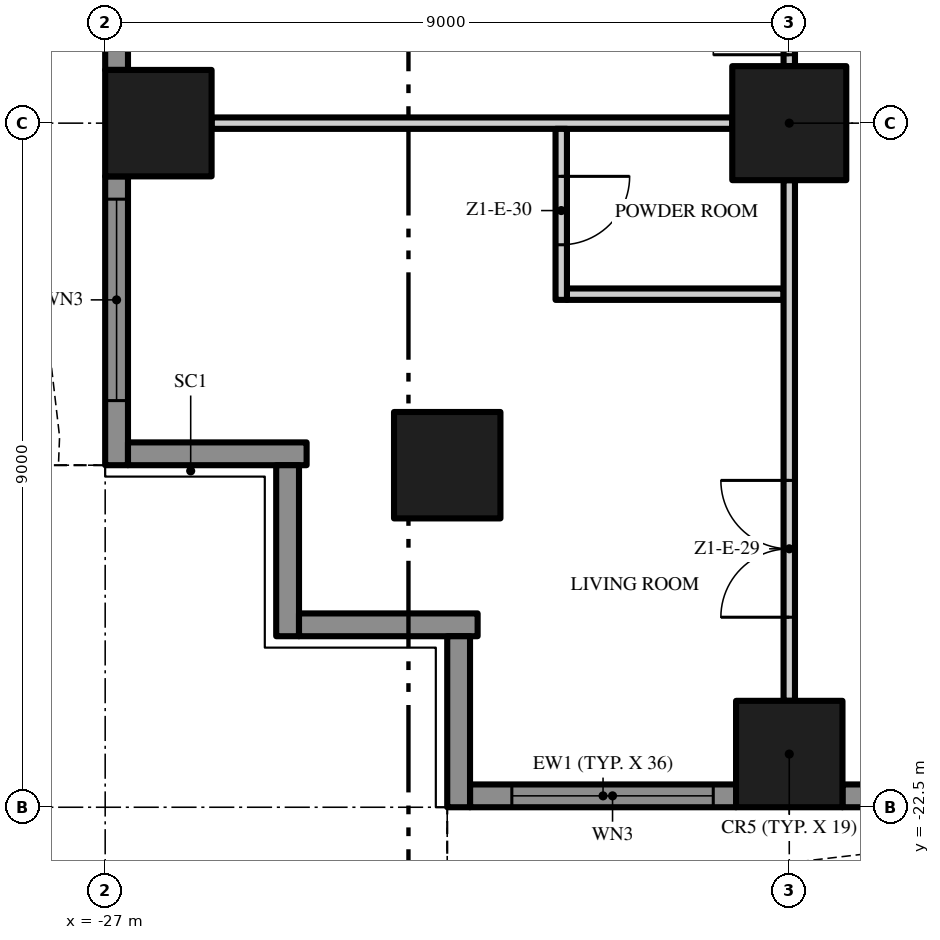
"""IFC4 building model, lengths in metres.
Left out: names, types, materials, properties, quantities, classifications, styles, units other than length and angle.
Written with IfcOpenShell. Run it as: python <this file> out.ifc"""

import sys

from ifc_helpers import new_model, si_unit, direction, frame, frame_2d, origin, origin_2d, place, context, subcontext, project, spatial, polyline, rectangle, outline, extrude, element, fill, save


model = new_model("IFC4")
c1 = context("Model", 3, precision=1e-05, world=origin(), true_north=direction((0.0, 1.0)))
c2 = subcontext(c1, "Body", "Model", "MODEL_VIEW")
j1 = project(units=[si_unit("LENGTHUNIT", "METRE"), si_unit("PLANEANGLEUNIT", "RADIAN")], contexts=[c1])
p1 = place(None, origin())
s1 = spatial("IfcSite", under=j1, at=p1, CompositionType="ELEMENT")
p2 = place(p1, origin())
s2 = spatial("IfcBuilding", under=s1, at=p2, CompositionType="ELEMENT")
p3 = place(p2, frame((0.0, 0.0, 56.8)))
s3 = spatial("IfcBuildingStorey", under=s2, at=p3, CompositionType="ELEMENT", Elevation=56.8)
p4 = place(p3, frame((-18.0, -13.5, 0.0), z_axis=(0.0, 0.0, 1.0), x_axis=(1.0, 0.0, 0.0)))
e1 = element("IfcColumn", 1, at=p4, inside=s3, PredefinedType="COLUMN", context=c2, shape_type="SweptSolid", body=[
    extrude(rectangle(XDim=1.5, YDim=1.5, at=origin_2d()), origin(), (0.0, 0.0, 1.0), 3.5),
])
for number, where, z_axis, x_axis in (
    (2, (-18.0, -21.8, 0.0), (0.0, 0.0, 1.0), (1.0, 0.0, 0.0)),
    (3, (-26.3, -13.5, 0.0), (0.0, 0.0, 1.0), (1.0, 0.0, 0.0)),
    (4, (-22.5, -18.0, 0.0), (0.0, 0.0, 1.0), (1.0, 0.0, 0.0)),
):
    element("IfcColumn", number, at=place(p3, frame(where, z_axis=z_axis, x_axis=x_axis)), inside=s3, PredefinedType="COLUMN", context=c2, shape_type="SweptSolid", body=[
        extrude(rectangle(XDim=1.4, YDim=1.4, at=origin_2d()), origin(), (0.0, 0.0, 1.0), 3.5),
    ])
p5 = place(p3, frame((-18.7, -22.35, 0.0), z_axis=(0.0, 0.0, 1.0), x_axis=(-1.0, 0.0, 0.0)))
e5 = element("IfcWall", 5, at=p5, inside=s3, PredefinedType="SOLIDWALL", context=c2, shape_type="SweptSolid", body=[
    extrude(rectangle(XDim=3.5, YDim=0.3, at=frame_2d((1.75, 0.0))), origin(), (0.0, 0.0, 1.0), 3.5),
])
p6 = place(p5, frame((0.3, 0.0, 0.45)))
e6 = element("IfcOpeningElement", 6, at=p6, cuts=e5, PredefinedType="OPENING", context=c2, shape_type="SweptSolid", body=[
    extrude(rectangle(XDim=2.65, YDim=2.65, at=frame_2d((1.325, 1.325))), frame((0.0, 0.16, 0.0), z_axis=(0.0, -1.0, 0.0), x_axis=(1.0, 0.0, 0.0)), (0.0, 0.0, 1.0), 0.32),
])
p7 = place(p3, frame((-9.7, -22.35, 0.0), z_axis=(0.0, 0.0, 1.0), x_axis=(-1.0, 0.0, 0.0)))
e7 = element("IfcWall", 7, at=p7, inside=s3, PredefinedType="SOLIDWALL", context=c2, shape_type="SweptSolid", body=[
    extrude(rectangle(XDim=7.6, YDim=0.3, at=frame_2d((3.8, 0.0))), origin(), (0.0, 0.0, 1.0), 3.5),
])
p8 = place(p7, frame((4.65, 0.0, 0.45)))
e8 = element("IfcOpeningElement", 8, at=p8, cuts=e7, PredefinedType="OPENING", context=c2, shape_type="SweptSolid", body=[
    extrude(rectangle(XDim=2.65, YDim=2.65, at=frame_2d((1.325, 1.325))), frame((0.0, 0.16, 0.0), z_axis=(0.0, -1.0, 0.0), x_axis=(1.0, 0.0, 0.0)), (0.0, 0.0, 1.0), 0.32),
])
p9 = place(p7, frame((0.3, 0.0, 0.0)))
e9 = element("IfcOpeningElement", 9, at=p9, cuts=e7, PredefinedType="OPENING", context=c2, shape_type="SweptSolid", body=[
    extrude(rectangle(XDim=2.65, YDim=2.4, at=frame_2d((1.325, 1.2))), frame((0.0, 0.16, 0.0), z_axis=(0.0, -1.0, 0.0), x_axis=(1.0, 0.0, 0.0)), (0.0, 0.0, 1.0), 0.32),
])
p10 = place(p3, frame((-26.85, -12.8, 0.0), z_axis=(0.0, 0.0, 1.0), x_axis=(0.0, 1.0, 0.0)))
e10 = element("IfcWall", 10, at=p10, inside=s3, PredefinedType="SOLIDWALL", context=c2, shape_type="SweptSolid", body=[
    extrude(rectangle(XDim=7.6, YDim=0.3, at=frame_2d((3.8, 0.0))), origin(), (0.0, 0.0, 1.0), 3.5),
])
p11 = place(p10, frame((4.65, 0.0, 0.45)))
e11 = element("IfcOpeningElement", 11, at=p11, cuts=e10, PredefinedType="OPENING", context=c2, shape_type="SweptSolid", body=[
    extrude(rectangle(XDim=2.65, YDim=2.65, at=frame_2d((1.325, 1.325))), frame((0.0, 0.16, 0.0), z_axis=(0.0, -1.0, 0.0), x_axis=(1.0, 0.0, 0.0)), (0.0, 0.0, 1.0), 0.32),
])
p12 = place(p10, frame((0.3, 0.0, 0.0)))
e12 = element("IfcOpeningElement", 12, at=p12, cuts=e10, PredefinedType="OPENING", context=c2, shape_type="SweptSolid", body=[
    extrude(rectangle(XDim=2.65, YDim=2.4, at=frame_2d((1.325, 1.2))), frame((0.0, 0.16, 0.0), z_axis=(0.0, -1.0, 0.0), x_axis=(1.0, 0.0, 0.0)), (0.0, 0.0, 1.0), 0.32),
])
p13 = place(p3, frame((-26.85, -18.0, 0.0), z_axis=(0.0, 0.0, 1.0), x_axis=(0.0, 1.0, 0.0)))
e13 = element("IfcWall", 13, at=p13, inside=s3, PredefinedType="SOLIDWALL", context=c2, shape_type="SweptSolid", body=[
    extrude(rectangle(XDim=3.8, YDim=0.3, at=frame_2d((1.9, 0.0))), origin(), (0.0, 0.0, 1.0), 3.5),
])
p14 = place(p13, frame((0.85, 0.0, 0.45)))
e14 = element("IfcOpeningElement", 14, at=p14, cuts=e13, PredefinedType="OPENING", context=c2, shape_type="SweptSolid", body=[
    extrude(rectangle(XDim=2.65, YDim=2.65, at=frame_2d((1.325, 1.325))), frame((0.0, 0.16, 0.0), z_axis=(0.0, -1.0, 0.0), x_axis=(1.0, 0.0, 0.0)), (0.0, 0.0, 1.0), 0.32),
])
p15 = place(p3, frame((-24.35, -17.85, 0.0), z_axis=(0.0, 0.0, 1.0), x_axis=(-1.0, 0.0, 0.0)))
e15 = element("IfcWall", 15, at=p15, inside=s3, PredefinedType="SOLIDWALL", context=c2, shape_type="SweptSolid", body=[
    extrude(rectangle(XDim=2.35, YDim=0.3, at=frame_2d((1.175, 0.0))), origin(), (0.0, 0.0, 1.0), 3.5),
])
p16 = place(p3, frame((-24.6, -20.25, 0.0), z_axis=(0.0, 0.0, 1.0), x_axis=(0.0, 1.0, 0.0)))
e16 = element("IfcWall", 16, at=p16, inside=s3, PredefinedType="SOLIDWALL", context=c2, shape_type="SweptSolid", body=[
    extrude(rectangle(XDim=2.25, YDim=0.3, at=frame_2d((1.125, 0.0))), origin(), (0.0, 0.0, 1.0), 3.5),
])
p17 = place(p3, frame((-22.1, -20.1, 0.0), z_axis=(0.0, 0.0, 1.0), x_axis=(-1.0, 0.0, 0.0)))
e17 = element("IfcWall", 17, at=p17, inside=s3, PredefinedType="SOLIDWALL", context=c2, shape_type="SweptSolid", body=[
    extrude(rectangle(XDim=2.35, YDim=0.3, at=frame_2d((1.175, 0.0))), origin(), (0.0, 0.0, 1.0), 3.5),
])
p18 = place(p3, frame((-22.35, -22.5, 0.0), z_axis=(0.0, 0.0, 1.0), x_axis=(0.0, 1.0, 0.0)))
e18 = element("IfcWall", 18, at=p18, inside=s3, PredefinedType="SOLIDWALL", context=c2, shape_type="SweptSolid", body=[
    extrude(rectangle(XDim=2.25, YDim=0.3, at=frame_2d((1.125, 0.0))), origin(), (0.0, 0.0, 1.0), 3.5),
])
p19 = place(p3, origin())
e19 = element("IfcWall", 19, at=p19, inside=s3, PredefinedType="USERDEFINED", context=c2, shape_type="SweptSolid", body=[
    extrude(outline(polyline([(-22.5, -25.149), (-21.0, -24.488), (-19.5, -23.755), (-18.0, -23.231), (-16.875, -23.1), (-16.5, -23.115), (-15.0, -23.451), (-13.5, -24.112), (-12.0, -24.845), (-10.5, -25.369), (-9.375, -25.5), (-9.0, -25.485), (-7.5, -25.149), (-6.0, -24.488), (-4.5, -23.755), (-3.0, -23.231), (-1.875, -23.1), (-1.5, -23.115), (0.0, -23.451), (1.5, -24.112), (3.0, -24.845), (4.5, -25.369), (5.625, -25.5), (6.0, -25.485), (7.5, -25.149), (9.0, -24.488), (10.5, -23.755), (12.0, -23.231), (13.125, -23.1), (13.5, -23.115), (15.0, -23.451), (16.5, -24.112), (18.0, -24.845), (19.5, -25.369), (20.625, -25.5), (21.0, -25.485), (22.5, -25.149), (22.445, -24.905), (20.967, -25.236), (20.635, -25.249), (19.556, -25.124), (18.096, -24.614), (16.605, -23.885), (15.079, -23.213), (13.533, -22.866), (13.115, -22.849), (11.944, -22.986), (10.404, -23.524), (8.895, -24.261), (7.421, -24.91), (5.967, -25.236), (5.635, -25.249), (4.556, -25.124), (3.096, -24.614), (1.605, -23.885), (0.079, -23.213), (-1.467, -22.866), (-1.885, -22.849), (-3.056, -22.986), (-4.596, -23.524), (-6.105, -24.261), (-7.579, -24.91), (-9.033, -25.236), (-9.365, -25.249), (-10.444, -25.124), (-11.904, -24.614), (-13.395, -23.885), (-14.921, -23.213), (-16.467, -22.866), (-16.885, -22.849), (-18.056, -22.986), (-19.596, -23.524), (-21.105, -24.261), (-22.601, -24.92), (-22.5, -25.149)])), origin(), (0.0, 0.0, 1.0), 0.9),
])
p20 = place(p3, origin())
e20 = element("IfcWall", 20, at=p20, inside=s3, PredefinedType="USERDEFINED", context=c2, shape_type="SweptSolid", body=[
    extrude(outline(polyline([(-29.649, 18.0), (-28.988, 16.5), (-28.255, 15.0), (-27.731, 13.5), (-27.6, 12.375), (-27.615, 12.0), (-27.951, 10.5), (-28.612, 9.0), (-29.345, 7.5), (-29.869, 6.0), (-30.0, 4.875), (-29.985, 4.5), (-29.649, 3.0), (-28.988, 1.5), (-28.255, 0.0), (-27.731, -1.5), (-27.6, -2.625), (-27.615, -3.0), (-27.951, -4.5), (-28.612, -6.0), (-29.345, -7.5), (-29.869, -9.0), (-30.0, -10.125), (-29.985, -10.5), (-29.649, -12.0), (-28.988, -13.5), (-28.255, -15.0), (-27.731, -16.5), (-27.6, -17.625), (-27.615, -18.0), (-27.365, -18.01), (-27.349, -17.615), (-27.486, -16.444), (-28.024, -14.904), (-28.761, -13.395), (-29.41, -11.921), (-29.736, -10.467), (-29.749, -10.135), (-29.624, -9.056), (-29.114, -7.596), (-28.385, -6.105), (-27.713, -4.579), (-27.366, -3.033), (-27.349, -2.615), (-27.486, -1.444), (-28.024, 0.096), (-28.761, 1.605), (-29.41, 3.079), (-29.736, 4.533), (-29.749, 4.865), (-29.624, 5.944), (-29.114, 7.404), (-28.385, 8.895), (-27.713, 10.421), (-27.366, 11.967), (-27.349, 12.385), (-27.486, 13.556), (-28.024, 15.096), (-28.761, 16.605), (-29.42, 18.101), (-29.649, 18.0)])), origin(), (0.0, 0.0, 1.0), 0.9),
])
p21 = place(p3, frame((-20.925, -15.75, 0.0), z_axis=(0.0, 0.0, 1.0), x_axis=(1.0, 0.0, 0.0)))
e21 = element("IfcWall", 21, at=p21, inside=s3, PredefinedType="PARTITIONING", context=c2, shape_type="SweptSolid", body=[
    extrude(rectangle(XDim=2.85, YDim=0.15, at=frame_2d((1.425, 0.0))), origin(), (0.0, 0.0, 1.0), 3.5),
])
p22 = place(p3, frame((-25.6, -13.5, 0.0), z_axis=(0.0, 0.0, 1.0), x_axis=(1.0, 0.0, 0.0)))
e22 = element("IfcWall", 22, at=p22, inside=s3, PredefinedType="PARTITIONING", context=c2, shape_type="SweptSolid", body=[
    extrude(rectangle(XDim=6.85, YDim=0.15, at=frame_2d((3.425, 0.0))), origin(), (0.0, 0.0, 1.0), 3.5),
])
p23 = place(p3, frame((-21.0, -13.575, 0.0), z_axis=(0.0, 0.0, 1.0), x_axis=(0.0, -1.0, 0.0)))
e23 = element("IfcWall", 23, at=p23, inside=s3, PredefinedType="PARTITIONING", context=c2, shape_type="SweptSolid", body=[
    extrude(rectangle(XDim=2.25, YDim=0.15, at=frame_2d((1.125, 0.0))), origin(), (0.0, 0.0, 1.0), 3.5),
])
p24 = place(p23, frame((0.625, 0.0, 0.0)))
e24 = element("IfcOpeningElement", 24, at=p24, cuts=e23, PredefinedType="OPENING", context=c2, shape_type="SweptSolid", body=[
    extrude(rectangle(XDim=0.9, YDim=2.1, at=frame_2d((0.45, 1.05))), frame((0.0, 0.085, 0.0), z_axis=(0.0, -1.0, 0.0), x_axis=(1.0, 0.0, 0.0)), (0.0, 0.0, 1.0), 0.17),
])
p25 = place(p3, frame((-18.0, -21.1, 0.0), z_axis=(0.0, 0.0, 1.0), x_axis=(0.0, 1.0, 0.0)))
e25 = element("IfcWall", 25, at=p25, inside=s3, PredefinedType="PARTITIONING", context=c2, shape_type="SweptSolid", body=[
    extrude(rectangle(XDim=6.85, YDim=0.15, at=frame_2d((3.425, 0.0))), origin(), (0.0, 0.0, 1.0), 3.5),
])
p26 = place(p25, frame((1.1, 0.0, 0.0)))
e26 = element("IfcOpeningElement", 26, at=p26, cuts=e25, PredefinedType="OPENING", context=c2, shape_type="SweptSolid", body=[
    extrude(rectangle(XDim=1.8, YDim=2.4, at=frame_2d((0.9, 1.2))), frame((0.0, 0.085, 0.0), z_axis=(0.0, -1.0, 0.0), x_axis=(1.0, 0.0, 0.0)), (0.0, 0.0, 1.0), 0.17),
])
p27 = place(p3, frame((-18.0, -12.75, 0.0), z_axis=(0.0, 0.0, 1.0), x_axis=(0.0, 1.0, 0.0)))
e27 = element("IfcWall", 27, at=p27, inside=s3, PredefinedType="PARTITIONING", context=c2, shape_type="SweptSolid", body=[
    extrude(rectangle(XDim=7.5, YDim=0.15, at=frame_2d((3.75, 0.0))), origin(), (0.0, 0.0, 1.0), 3.5),
])
p28 = place(p27, frame((6.35, 0.0, 0.0)))
e28 = element("IfcOpeningElement", 28, at=p28, cuts=e27, PredefinedType="OPENING", context=c2, shape_type="SweptSolid", body=[
    extrude(rectangle(XDim=1.0, YDim=2.4, at=frame_2d((0.5, 1.2))), frame((0.0, 0.085, 0.0), z_axis=(0.0, -1.0, 0.0), x_axis=(1.0, 0.0, 0.0)), (0.0, 0.0, 1.0), 0.17),
])
p29 = place(p27, frame((0.15, 0.0, 0.0)))
e29 = element("IfcOpeningElement", 29, at=p29, cuts=e27, PredefinedType="OPENING", context=c2, shape_type="SweptSolid", body=[
    extrude(rectangle(XDim=1.0, YDim=2.4, at=frame_2d((0.5, 1.2))), frame((0.0, 0.085, 0.0), z_axis=(0.0, -1.0, 0.0), x_axis=(1.0, 0.0, 0.0)), (0.0, 0.0, 1.0), 0.17),
])
p30 = place(p6, origin())
e30 = element("IfcWindow", 30, at=p30, inside=s3, PartitioningType="SINGLE_PANEL", PredefinedType="WINDOW", context=c2, shape_type="SweptSolid", body=[
    extrude(rectangle(XDim=2.65, YDim=2.65, at=frame_2d((1.325, 1.325))), frame((0.0, 0.03, 0.0), z_axis=(0.0, -1.0, 0.0), x_axis=(1.0, 0.0, 0.0)), (0.0, 0.0, 1.0), 0.06),
])
fill(e6, e30)
p31 = place(p14, origin())
e31 = element("IfcWindow", 31, at=p31, inside=s3, PartitioningType="SINGLE_PANEL", PredefinedType="WINDOW", context=c2, shape_type="SweptSolid", body=[
    extrude(rectangle(XDim=2.65, YDim=2.65, at=frame_2d((1.325, 1.325))), frame((0.0, 0.03, 0.0), z_axis=(0.0, -1.0, 0.0), x_axis=(1.0, 0.0, 0.0)), (0.0, 0.0, 1.0), 0.06),
])
fill(e14, e31)
p32 = place(p29, origin())
e32 = element("IfcDoor", 32, at=p32, inside=s3, OperationType="SINGLE_SWING_LEFT", PredefinedType="DOOR", context=c2, shape_type="SweptSolid", body=[
    extrude(rectangle(XDim=1.0, YDim=2.4, at=frame_2d((0.5, 1.2))), frame((0.0, 0.025, 0.0), z_axis=(0.0, -1.0, 0.0), x_axis=(1.0, 0.0, 0.0)), (0.0, 0.0, 1.0), 0.05),
])
fill(e29, e32)
p33 = place(p26, origin())
e33 = element("IfcDoor", 33, at=p33, inside=s3, OperationType="DOUBLE_DOOR_SINGLE_SWING", PredefinedType="DOOR", context=c2, shape_type="SweptSolid", body=[
    extrude(rectangle(XDim=1.8, YDim=2.4, at=frame_2d((0.9, 1.2))), frame((0.0, 0.025, 0.0), z_axis=(0.0, -1.0, 0.0), x_axis=(1.0, 0.0, 0.0)), (0.0, 0.0, 1.0), 0.05),
])
fill(e26, e33)
p34 = place(p24, origin())
e34 = element("IfcDoor", 34, at=p34, inside=s3, OperationType="SINGLE_SWING_LEFT", PredefinedType="DOOR", context=c2, shape_type="SweptSolid", body=[
    extrude(rectangle(XDim=0.9, YDim=2.1, at=frame_2d((0.45, 1.05))), frame((0.0, 0.025, 0.0), z_axis=(0.0, -1.0, 0.0), x_axis=(1.0, 0.0, 0.0)), (0.0, 0.0, 1.0), 0.05),
])
fill(e24, e34)
save(model, sys.argv[1])
